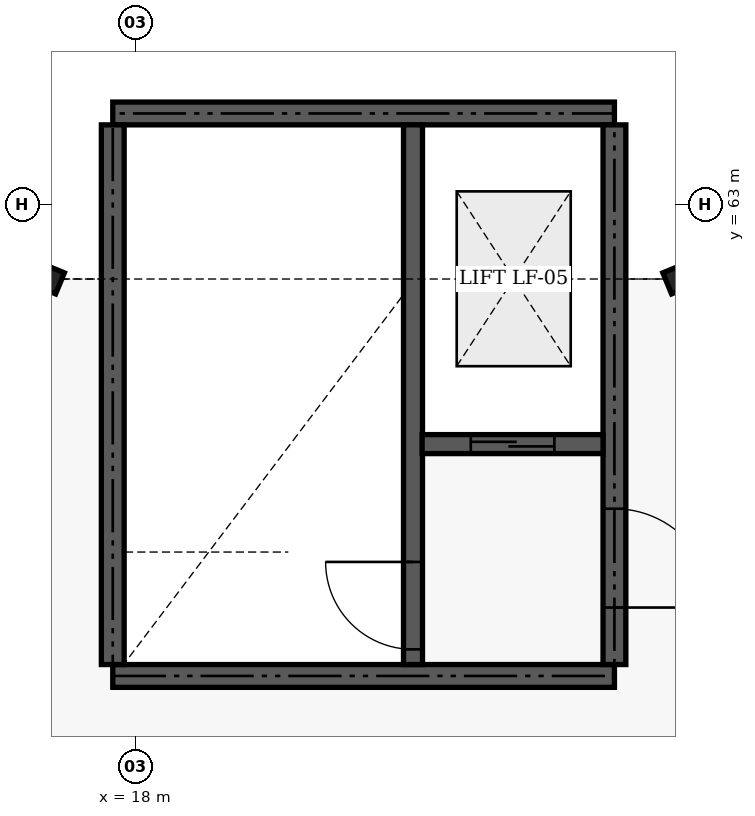
"""IFC4 building model, lengths in metres.
Left out: names, types, materials, properties, quantities, classifications, styles, units other than length and angle.
Written with IfcOpenShell. Run it as: python <this file> out.ifc"""

import sys

from ifc_helpers import new_model, si_unit, direction, frame, frame_2d, origin, origin_2d, place, context, subcontext, project, spatial, rectangle, i_section, extrude, element, fill, save


model = new_model("IFC4")
c1 = context("Model", 3, precision=1e-05, world=origin(), true_north=direction((0.0, 1.0)))
c2 = subcontext(c1, "Body", "Model", "MODEL_VIEW")
j1 = project(units=[si_unit("LENGTHUNIT", "METRE"), si_unit("PLANEANGLEUNIT", "RADIAN")], contexts=[c1])
p1 = place(None, origin())
s1 = spatial("IfcSite", under=j1, at=p1, CompositionType="ELEMENT")
p2 = place(p1, origin())
s2 = spatial("IfcBuilding", under=s1, at=p2, CompositionType="ELEMENT")
p3 = place(p2, frame((0.0, 0.0, 5.4)))
s3 = spatial("IfcBuildingStorey", under=s2, at=p3, CompositionType="ELEMENT", Elevation=5.4)
for number, where, z_axis, x_axis in (
    (1, (16.867, 62.022, 0.0), (0.0, 0.0, 1.0), (-0.383, -0.924, 0.0)),
    (2, (25.133, 62.022, 0.0), (0.0, 0.0, 1.0), (0.383, -0.924, 0.0)),
):
    element("IfcColumn", number, at=place(p3, frame(where, z_axis=z_axis, x_axis=x_axis)), inside=s3, PredefinedType="COLUMN", context=c2, shape_type="SweptSolid", body=[
        extrude(i_section(OverallWidth=0.3, OverallDepth=0.3, WebThickness=0.011, FlangeThickness=0.019, FilletRadius=0.027, at=origin_2d()), origin(), (0.0, 0.0, 1.0), 5.18),
    ])
for number, where, z_axis, x_axis in (
    (3, (17.7, 56.8, 0.0), (0.0, 0.0, 1.0), (1.0, 0.0, 0.0)),
    (4, (17.7, 64.2, 0.0), (0.0, 0.0, 1.0), (1.0, 0.0, 0.0)),
):
    element("IfcWall", number, at=place(p3, frame(where, z_axis=z_axis, x_axis=x_axis)), inside=s3, PredefinedType="SHEAR", context=c2, shape_type="SweptSolid", body=[
        extrude(rectangle(XDim=6.6, YDim=0.3, at=frame_2d((3.3, 0.0))), origin(), (0.0, 0.0, 1.0), 4.0),
    ])
p4 = place(p3, frame((17.7, 56.95, 0.0), z_axis=(0.0, 0.0, 1.0), x_axis=(0.0, 1.0, 0.0)))
e5 = element("IfcWall", 5, at=p4, inside=s3, PredefinedType="SHEAR", context=c2, shape_type="SweptSolid", body=[
    extrude(rectangle(XDim=7.1, YDim=0.3, at=frame_2d((3.55, 0.0))), origin(), (0.0, 0.0, 1.0), 4.0),
])
p5 = place(p3, frame((24.3, 56.95, 0.0), z_axis=(0.0, 0.0, 1.0), x_axis=(0.0, 1.0, 0.0)))
e6 = element("IfcWall", 6, at=p5, inside=s3, PredefinedType="SHEAR", context=c2, shape_type="SweptSolid", body=[
    extrude(rectangle(XDim=7.1, YDim=0.3, at=frame_2d((3.55, 0.0))), origin(), (0.0, 0.0, 1.0), 4.0),
])
p6 = place(p5, frame((0.75, 0.0, 0.0)))
e7 = element("IfcOpeningElement", 7, at=p6, cuts=e6, PredefinedType="OPENING", context=c2, shape_type="SweptSolid", body=[
    extrude(rectangle(XDim=1.3, YDim=2.15, at=frame_2d((0.65, 1.075))), frame((0.0, 0.16, 0.0), z_axis=(0.0, -1.0, 0.0), x_axis=(1.0, 0.0, 0.0)), (0.0, 0.0, 1.0), 0.32),
])
p7 = place(p3, frame((21.65, 56.95, 0.0), z_axis=(0.0, 0.0, 1.0), x_axis=(0.0, 1.0, 0.0)))
e8 = element("IfcWall", 8, at=p7, inside=s3, PredefinedType="SHEAR", context=c2, shape_type="SweptSolid", body=[
    extrude(rectangle(XDim=7.1, YDim=0.25, at=frame_2d((3.55, 0.0))), origin(), (0.0, 0.0, 1.0), 4.0),
])
p8 = place(p7, frame((0.2, 0.0, 0.0)))
e9 = element("IfcOpeningElement", 9, at=p8, cuts=e8, PredefinedType="OPENING", context=c2, shape_type="SweptSolid", body=[
    extrude(rectangle(XDim=1.15, YDim=2.15, at=frame_2d((0.575, 1.075))), frame((0.0, 0.135, 0.0), z_axis=(0.0, -1.0, 0.0), x_axis=(1.0, 0.0, 0.0)), (0.0, 0.0, 1.0), 0.27),
])
p9 = place(p3, frame((21.77, 59.85, 0.0), z_axis=(0.0, 0.0, 1.0), x_axis=(1.0, 0.0, 0.0)))
e10 = element("IfcWall", 10, at=p9, inside=s3, PredefinedType="SHEAR", context=c2, shape_type="SweptSolid", body=[
    extrude(rectangle(XDim=2.38, YDim=0.25, at=frame_2d((1.19, 0.0))), origin(), (0.0, 0.0, 1.0), 4.0),
])
p10 = place(p9, frame((0.64, 0.0, 0.0)))
e11 = element("IfcOpeningElement", 11, at=p10, cuts=e10, PredefinedType="OPENING", context=c2, shape_type="SweptSolid", body=[
    extrude(rectangle(XDim=1.1, YDim=2.15, at=frame_2d((0.55, 1.075))), frame((0.0, 0.135, 0.0), z_axis=(0.0, -1.0, 0.0), x_axis=(1.0, 0.0, 0.0)), (0.0, 0.0, 1.0), 0.27),
])
p11 = place(p6, frame((1.3, 0.0, 0.0), z_axis=(0.0, 0.0, 1.0), x_axis=(-1.0, 0.0, 0.0)))
e12 = element("IfcDoor", 12, at=p11, inside=s3, OperationType="DOUBLE_DOOR_SINGLE_SWING", PredefinedType="DOOR", context=c2, shape_type="SweptSolid", body=[
    extrude(rectangle(XDim=1.3, YDim=2.15, at=frame_2d((0.65, 1.075))), frame((0.0, 0.025, 0.0), z_axis=(0.0, -1.0, 0.0), x_axis=(1.0, 0.0, 0.0)), (0.0, 0.0, 1.0), 0.05),
])
fill(e7, e12)
p12 = place(p8, frame((1.15, 0.0, 0.0), z_axis=(0.0, 0.0, 1.0), x_axis=(-1.0, 0.0, 0.0)))
e13 = element("IfcDoor", 13, at=p12, inside=s3, OperationType="SINGLE_SWING_RIGHT", PredefinedType="DOOR", context=c2, shape_type="SweptSolid", body=[
    extrude(rectangle(XDim=1.15, YDim=2.15, at=frame_2d((0.575, 1.075))), frame((0.0, 0.025, 0.0), z_axis=(0.0, -1.0, 0.0), x_axis=(1.0, 0.0, 0.0)), (0.0, 0.0, 1.0), 0.05),
])
fill(e9, e13)
p13 = place(p10, origin())
e14 = element("IfcDoor", 14, at=p13, inside=s3, OperationType="SLIDING_TO_LEFT", PredefinedType="DOOR", context=c2, shape_type="SweptSolid", body=[
    extrude(rectangle(XDim=1.1, YDim=2.15, at=frame_2d((0.55, 1.075))), frame((0.0, 0.025, 0.0), z_axis=(0.0, -1.0, 0.0), x_axis=(1.0, 0.0, 0.0)), (0.0, 0.0, 1.0), 0.05),
])
fill(e11, e14)
save(model, sys.argv[1])
